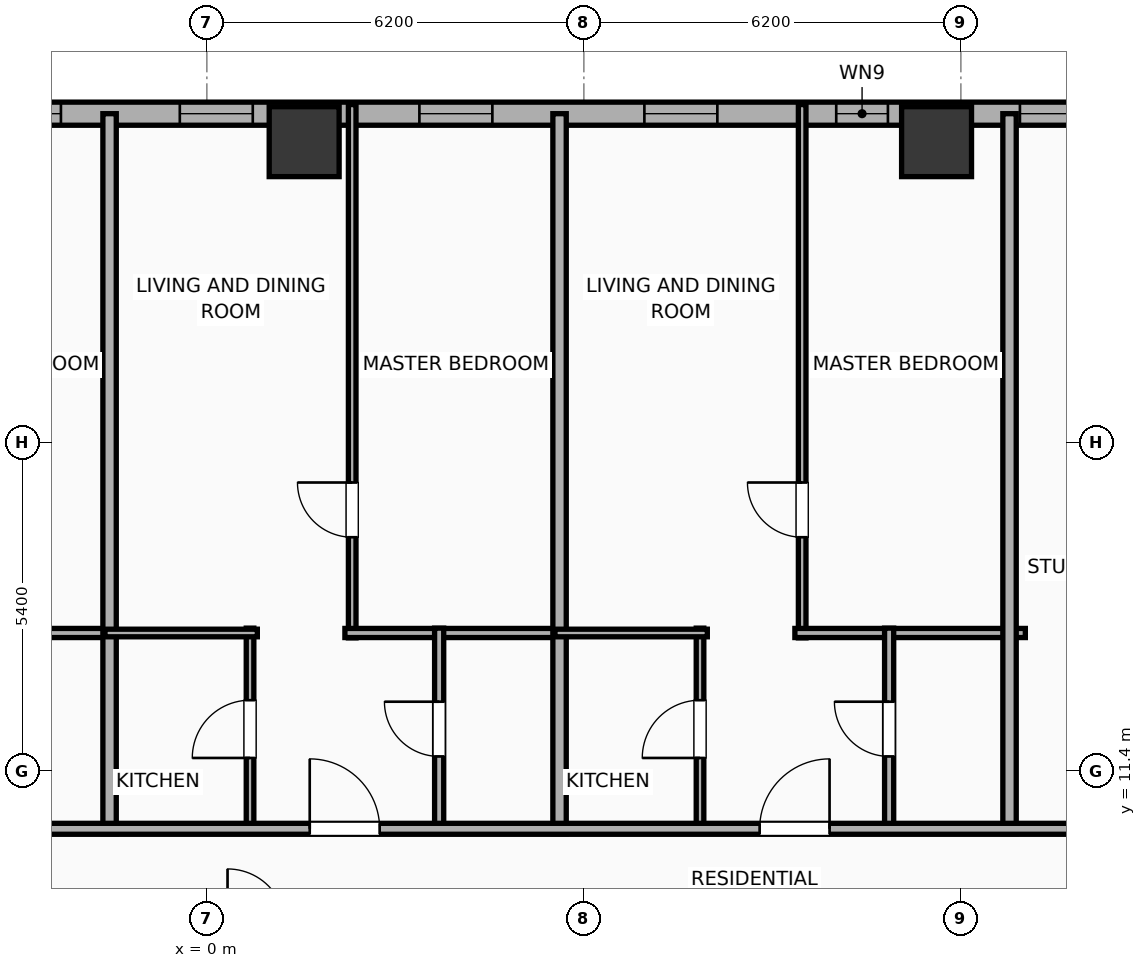
"""IFC4 building model, lengths in metres.
Left out: names, types, materials, properties, quantities, classifications, styles, units other than length and angle.
Written with IfcOpenShell. Run it as: python <this file> out.ifc"""

import sys

from ifc_helpers import new_model, si_unit, direction, frame, frame_2d, origin, origin_2d, place, context, subcontext, project, spatial, rectangle, hollow_rectangle, extrude, element, fill, save


model = new_model("IFC4")
c1 = context("Model", 3, precision=1e-05, world=origin(), true_north=direction((0.0, 1.0)))
c2 = subcontext(c1, "Body", "Model", "MODEL_VIEW")
j1 = project(units=[si_unit("LENGTHUNIT", "METRE"), si_unit("PLANEANGLEUNIT", "RADIAN")], contexts=[c1])
p1 = place(None, origin())
s1 = spatial("IfcSite", under=j1, at=p1, CompositionType="ELEMENT")
p2 = place(p1, origin())
s2 = spatial("IfcBuilding", under=s1, at=p2, CompositionType="ELEMENT")
p3 = place(p2, frame((0.0, 0.0, 57.2)))
s3 = spatial("IfcBuildingStorey", under=s2, at=p3, CompositionType="ELEMENT", Elevation=57.2)
for number, where, z_axis, x_axis in (
    (1, (12.0, 21.75, 0.0), (0.0, 0.0, 1.0), (1.0, 0.0, 0.0)),
    (2, (1.6, 21.75, 0.0), (0.0, 0.0, 1.0), (1.0, 0.0, 0.0)),
):
    element("IfcColumn", number, at=place(p3, frame(where, z_axis=z_axis, x_axis=x_axis)), inside=s3, PredefinedType="COLUMN", context=c2, shape_type="SweptSolid", body=[
        extrude(hollow_rectangle(XDim=1.15, YDim=1.15, WallThickness=0.04, at=origin_2d()), origin(), (0.0, 0.0, 1.0), 3.9),
    ])
p4 = place(p3, frame((-29.581, 22.21, 0.0), z_axis=(0.0, 0.0, 1.0), x_axis=(1.0, 0.0, 0.0)))
e3 = element("IfcWall", 3, at=p4, inside=s3, PredefinedType="ELEMENTEDWALL", context=c2, shape_type="SweptSolid", body=[
    extrude(rectangle(XDim=51.963, YDim=0.38, at=frame_2d((25.981, 0.0))), origin(), (0.0, 0.0, 1.0), 3.65),
])
p5 = place(p4, frame((6.61, 0.0, 0.75)))
e4 = element("IfcOpeningElement", 4, at=p5, cuts=e3, PredefinedType="OPENING", context=c2, shape_type="SweptSolid", body=[
    extrude(rectangle(XDim=2.4, YDim=2.1, at=frame_2d((1.2, 1.05))), frame((0.0, 0.2, 0.0), z_axis=(0.0, -1.0, 0.0), x_axis=(1.0, 0.0, 0.0)), (0.0, 0.0, 1.0), 0.4),
])
p6 = place(p4, frame((24.781, 0.0, 0.75)))
e5 = element("IfcOpeningElement", 5, at=p6, cuts=e3, PredefinedType="OPENING", context=c2, shape_type="SweptSolid", body=[
    extrude(rectangle(XDim=2.4, YDim=2.1, at=frame_2d((1.2, 1.05))), frame((0.0, 0.2, 0.0), z_axis=(0.0, -1.0, 0.0), x_axis=(1.0, 0.0, 0.0)), (0.0, 0.0, 1.0), 0.4),
])
p7 = place(p4, frame((42.952, 0.0, 0.75)))
e6 = element("IfcOpeningElement", 6, at=p7, cuts=e3, PredefinedType="OPENING", context=c2, shape_type="SweptSolid", body=[
    extrude(rectangle(XDim=2.4, YDim=2.1, at=frame_2d((1.2, 1.05))), frame((0.0, 0.2, 0.0), z_axis=(0.0, -1.0, 0.0), x_axis=(1.0, 0.0, 0.0)), (0.0, 0.0, 1.0), 0.4),
])
p8 = place(p4, frame((3.476, 0.0, 0.75)))
e7 = element("IfcOpeningElement", 7, at=p8, cuts=e3, PredefinedType="OPENING", context=c2, shape_type="SweptSolid", body=[
    extrude(rectangle(XDim=1.2, YDim=2.05, at=frame_2d((0.6, 1.025))), frame((0.0, 0.2, 0.0), z_axis=(0.0, -1.0, 0.0), x_axis=(1.0, 0.0, 0.0)), (0.0, 0.0, 1.0), 0.4),
])
p9 = place(p4, frame((11.236, 0.0, 0.75)))
e8 = element("IfcOpeningElement", 8, at=p9, cuts=e3, PredefinedType="OPENING", context=c2, shape_type="SweptSolid", body=[
    extrude(rectangle(XDim=1.2, YDim=2.05, at=frame_2d((0.6, 1.025))), frame((0.0, 0.2, 0.0), z_axis=(0.0, -1.0, 0.0), x_axis=(1.0, 0.0, 0.0)), (0.0, 0.0, 1.0), 0.4),
])
p10 = place(p4, frame((14.576, 0.0, 0.75)))
e9 = element("IfcOpeningElement", 9, at=p10, cuts=e3, PredefinedType="OPENING", context=c2, shape_type="SweptSolid", body=[
    extrude(rectangle(XDim=1.2, YDim=2.05, at=frame_2d((0.6, 1.025))), frame((0.0, 0.2, 0.0), z_axis=(0.0, -1.0, 0.0), x_axis=(1.0, 0.0, 0.0)), (0.0, 0.0, 1.0), 0.4),
])
p11 = place(p4, frame((18.276, 0.0, 0.75)))
e10 = element("IfcOpeningElement", 10, at=p11, cuts=e3, PredefinedType="OPENING", context=c2, shape_type="SweptSolid", body=[
    extrude(rectangle(XDim=1.2, YDim=2.05, at=frame_2d((0.6, 1.025))), frame((0.0, 0.2, 0.0), z_axis=(0.0, -1.0, 0.0), x_axis=(1.0, 0.0, 0.0)), (0.0, 0.0, 1.0), 0.4),
])
p12 = place(p4, frame((21.976, 0.0, 0.75)))
e11 = element("IfcOpeningElement", 11, at=p12, cuts=e3, PredefinedType="OPENING", context=c2, shape_type="SweptSolid", body=[
    extrude(rectangle(XDim=1.2, YDim=2.05, at=frame_2d((0.6, 1.025))), frame((0.0, 0.2, 0.0), z_axis=(0.0, -1.0, 0.0), x_axis=(1.0, 0.0, 0.0)), (0.0, 0.0, 1.0), 0.4),
])
p13 = place(p4, frame((29.136, 0.0, 0.75)))
e12 = element("IfcOpeningElement", 12, at=p13, cuts=e3, PredefinedType="OPENING", context=c2, shape_type="SweptSolid", body=[
    extrude(rectangle(XDim=1.2, YDim=2.05, at=frame_2d((0.6, 1.025))), frame((0.0, 0.2, 0.0), z_axis=(0.0, -1.0, 0.0), x_axis=(1.0, 0.0, 0.0)), (0.0, 0.0, 1.0), 0.4),
])
p14 = place(p4, frame((33.076, 0.0, 0.75)))
e13 = element("IfcOpeningElement", 13, at=p14, cuts=e3, PredefinedType="OPENING", context=c2, shape_type="SweptSolid", body=[
    extrude(rectangle(XDim=1.2, YDim=2.05, at=frame_2d((0.6, 1.025))), frame((0.0, 0.2, 0.0), z_axis=(0.0, -1.0, 0.0), x_axis=(1.0, 0.0, 0.0)), (0.0, 0.0, 1.0), 0.4),
])
p15 = place(p4, frame((36.776, 0.0, 0.75)))
e14 = element("IfcOpeningElement", 14, at=p15, cuts=e3, PredefinedType="OPENING", context=c2, shape_type="SweptSolid", body=[
    extrude(rectangle(XDim=1.2, YDim=2.05, at=frame_2d((0.6, 1.025))), frame((0.0, 0.2, 0.0), z_axis=(0.0, -1.0, 0.0), x_axis=(1.0, 0.0, 0.0)), (0.0, 0.0, 1.0), 0.4),
])
p16 = place(p4, frame((39.931, 0.0, 0.75)))
e15 = element("IfcOpeningElement", 15, at=p16, cuts=e3, PredefinedType="OPENING", context=c2, shape_type="SweptSolid", body=[
    extrude(rectangle(XDim=0.85, YDim=2.05, at=frame_2d((0.425, 1.025))), frame((0.0, 0.2, 0.0), z_axis=(0.0, -1.0, 0.0), x_axis=(1.0, 0.0, 0.0)), (0.0, 0.0, 1.0), 0.4),
])
p17 = place(p4, frame((47.469, 0.0, 0.75)))
e16 = element("IfcOpeningElement", 16, at=p17, cuts=e3, PredefinedType="OPENING", context=c2, shape_type="SweptSolid", body=[
    extrude(rectangle(XDim=1.2, YDim=2.05, at=frame_2d((0.6, 1.025))), frame((0.0, 0.2, 0.0), z_axis=(0.0, -1.0, 0.0), x_axis=(1.0, 0.0, 0.0)), (0.0, 0.0, 1.0), 0.4),
])
p18 = place(p4, frame((49.581, 0.0, 0.75)))
e17 = element("IfcOpeningElement", 17, at=p18, cuts=e3, PredefinedType="OPENING", context=c2, shape_type="SweptSolid", body=[
    extrude(rectangle(XDim=1.2, YDim=2.05, at=frame_2d((0.6, 1.025))), frame((0.0, 0.2, 0.0), z_axis=(0.0, -1.0, 0.0), x_axis=(1.0, 0.0, 0.0)), (0.0, 0.0, 1.0), 0.4),
])
p19 = place(p3, frame((-5.13, 13.67, 0.0), z_axis=(0.0, 0.0, 1.0), x_axis=(1.0, 0.0, 0.0)))
e18 = element("IfcWall", 18, at=p19, inside=s3, PredefinedType="PLUMBINGWALL", context=c2, shape_type="SweptSolid", body=[
    extrude(rectangle(XDim=3.605, YDim=0.15, at=frame_2d((1.802, 0.0))), origin(), (0.0, 0.0, 1.0), 3.65),
])
p20 = place(p3, frame((-1.6, 10.37, 0.0), z_axis=(0.0, 0.0, 1.0), x_axis=(0.0, 1.0, 0.0)))
e19 = element("IfcWall", 19, at=p20, inside=s3, PredefinedType="PARTITIONING", context=c2, shape_type="SweptSolid", body=[
    extrude(rectangle(XDim=11.84, YDim=0.22, at=frame_2d((5.92, 0.0))), origin(), (0.0, 0.0, 1.0), 3.65),
])
p21 = place(p3, frame((2.39, 13.59, 0.0), z_axis=(0.0, 0.0, 1.0), x_axis=(0.0, 1.0, 0.0)))
e20 = element("IfcWall", 20, at=p21, inside=s3, PredefinedType="PARTITIONING", context=c2, shape_type="SweptSolid", body=[
    extrude(rectangle(XDim=8.77, YDim=0.125, at=frame_2d((4.385, 0.0))), origin(), (0.0, 0.0, 1.0), 2.94),
])
p22 = place(p21, frame((1.655, 0.0, 0.0)))
e21 = element("IfcOpeningElement", 21, at=p22, cuts=e20, PredefinedType="OPENING", context=c2, shape_type="SweptSolid", body=[
    extrude(rectangle(XDim=0.9, YDim=2.05, at=frame_2d((0.45, 1.025))), frame((0.0, 0.073, 0.0), z_axis=(0.0, -1.0, 0.0), x_axis=(1.0, 0.0, 0.0)), (0.0, 0.0, 1.0), 0.145),
])
p23 = place(p3, frame((2.27, 13.67, 0.0), z_axis=(0.0, 0.0, 1.0), x_axis=(1.0, 0.0, 0.0)))
e22 = element("IfcWall", 22, at=p23, inside=s3, PredefinedType="PLUMBINGWALL", context=c2, shape_type="SweptSolid", body=[
    extrude(rectangle(XDim=3.605, YDim=0.15, at=frame_2d((1.802, 0.0))), origin(), (0.0, 0.0, 1.0), 3.65),
])
p24 = place(p3, frame((0.71, 10.43, 0.0), z_axis=(0.0, 0.0, 1.0), x_axis=(0.0, 1.0, 0.0)))
e23 = element("IfcWall", 23, at=p24, inside=s3, PredefinedType="PARTITIONING", context=c2, shape_type="SweptSolid", body=[
    extrude(rectangle(XDim=3.32, YDim=0.125, at=frame_2d((1.66, 0.0))), origin(), (0.0, 0.0, 1.0), 3.65),
])
p25 = place(p24, frame((1.185, 0.0, 0.0)))
e24 = element("IfcOpeningElement", 24, at=p25, cuts=e23, PredefinedType="OPENING", context=c2, shape_type="SweptSolid", body=[
    extrude(rectangle(XDim=0.95, YDim=2.05, at=frame_2d((0.475, 1.025))), frame((0.0, 0.073, 0.0), z_axis=(0.0, -1.0, 0.0), x_axis=(1.0, 0.0, 0.0)), (0.0, 0.0, 1.0), 0.145),
])
p26 = place(p3, frame((-1.675, 13.67, 0.0), z_axis=(0.0, 0.0, 1.0), x_axis=(1.0, 0.0, 0.0)))
e25 = element("IfcWall", 25, at=p26, inside=s3, PredefinedType="PARTITIONING", context=c2, shape_type="SweptSolid", body=[
    extrude(rectangle(XDim=2.505, YDim=0.125, at=frame_2d((1.252, 0.0))), origin(), (0.0, 0.0, 1.0), 3.65),
])
p27 = place(p3, frame((3.82, 10.43, 0.0), z_axis=(0.0, 0.0, 1.0), x_axis=(0.0, 1.0, 0.0)))
e26 = element("IfcWall", 26, at=p27, inside=s3, PredefinedType="PLUMBINGWALL", context=c2, shape_type="SweptSolid", body=[
    extrude(rectangle(XDim=3.32, YDim=0.15, at=frame_2d((1.66, 0.0))), origin(), (0.0, 0.0, 1.0), 2.94),
])
p28 = place(p27, frame((1.21, 0.0, 0.0)))
e27 = element("IfcOpeningElement", 27, at=p28, cuts=e26, PredefinedType="OPENING", context=c2, shape_type="SweptSolid", body=[
    extrude(rectangle(XDim=0.9, YDim=2.05, at=frame_2d((0.45, 1.025))), frame((0.0, 0.085, 0.0), z_axis=(0.0, -1.0, 0.0), x_axis=(1.0, 0.0, 0.0)), (0.0, 0.0, 1.0), 0.17),
])
p29 = place(p3, frame((5.8, 10.37, 0.0), z_axis=(0.0, 0.0, 1.0), x_axis=(0.0, 1.0, 0.0)))
e28 = element("IfcWall", 28, at=p29, inside=s3, PredefinedType="PARTITIONING", context=c2, shape_type="SweptSolid", body=[
    extrude(rectangle(XDim=11.84, YDim=0.22, at=frame_2d((5.92, 0.0))), origin(), (0.0, 0.0, 1.0), 3.65),
])
p30 = place(p3, frame((9.79, 13.59, 0.0), z_axis=(0.0, 0.0, 1.0), x_axis=(0.0, 1.0, 0.0)))
e29 = element("IfcWall", 29, at=p30, inside=s3, PredefinedType="PARTITIONING", context=c2, shape_type="SweptSolid", body=[
    extrude(rectangle(XDim=8.77, YDim=0.125, at=frame_2d((4.385, 0.0))), origin(), (0.0, 0.0, 1.0), 3.65),
])
p31 = place(p30, frame((1.655, 0.0, 0.0)))
e30 = element("IfcOpeningElement", 30, at=p31, cuts=e29, PredefinedType="OPENING", context=c2, shape_type="SweptSolid", body=[
    extrude(rectangle(XDim=0.9, YDim=2.05, at=frame_2d((0.45, 1.025))), frame((0.0, 0.073, 0.0), z_axis=(0.0, -1.0, 0.0), x_axis=(1.0, 0.0, 0.0)), (0.0, 0.0, 1.0), 0.145),
])
p32 = place(p3, frame((9.67, 13.67, 0.0), z_axis=(0.0, 0.0, 1.0), x_axis=(1.0, 0.0, 0.0)))
e31 = element("IfcWall", 31, at=p32, inside=s3, PredefinedType="PLUMBINGWALL", context=c2, shape_type="SweptSolid", body=[
    extrude(rectangle(XDim=3.79, YDim=0.15, at=frame_2d((1.895, 0.0))), origin(), (0.0, 0.0, 1.0), 3.65),
])
p33 = place(p3, frame((8.11, 10.43, 0.0), z_axis=(0.0, 0.0, 1.0), x_axis=(0.0, 1.0, 0.0)))
e32 = element("IfcWall", 32, at=p33, inside=s3, PredefinedType="PARTITIONING", context=c2, shape_type="SweptSolid", body=[
    extrude(rectangle(XDim=3.32, YDim=0.125, at=frame_2d((1.66, 0.0))), origin(), (0.0, 0.0, 1.0), 3.65),
])
p34 = place(p33, frame((1.185, 0.0, 0.0)))
e33 = element("IfcOpeningElement", 33, at=p34, cuts=e32, PredefinedType="OPENING", context=c2, shape_type="SweptSolid", body=[
    extrude(rectangle(XDim=0.95, YDim=2.05, at=frame_2d((0.475, 1.025))), frame((0.0, 0.073, 0.0), z_axis=(0.0, -1.0, 0.0), x_axis=(1.0, 0.0, 0.0)), (0.0, 0.0, 1.0), 0.145),
])
p35 = place(p3, frame((5.725, 13.67, 0.0), z_axis=(0.0, 0.0, 1.0), x_axis=(1.0, 0.0, 0.0)))
e34 = element("IfcWall", 34, at=p35, inside=s3, PredefinedType="PARTITIONING", context=c2, shape_type="SweptSolid", body=[
    extrude(rectangle(XDim=2.505, YDim=0.125, at=frame_2d((1.252, 0.0))), origin(), (0.0, 0.0, 1.0), 3.65),
])
p36 = place(p3, frame((11.22, 10.43, 0.0), z_axis=(0.0, 0.0, 1.0), x_axis=(0.0, 1.0, 0.0)))
e35 = element("IfcWall", 35, at=p36, inside=s3, PredefinedType="PLUMBINGWALL", context=c2, shape_type="SweptSolid", body=[
    extrude(rectangle(XDim=3.32, YDim=0.15, at=frame_2d((1.66, 0.0))), origin(), (0.0, 0.0, 1.0), 3.65),
])
p37 = place(p36, frame((1.21, 0.0, 0.0)))
e36 = element("IfcOpeningElement", 36, at=p37, cuts=e35, PredefinedType="OPENING", context=c2, shape_type="SweptSolid", body=[
    extrude(rectangle(XDim=0.9, YDim=2.05, at=frame_2d((0.45, 1.025))), frame((0.0, 0.085, 0.0), z_axis=(0.0, -1.0, 0.0), x_axis=(1.0, 0.0, 0.0)), (0.0, 0.0, 1.0), 0.17),
])
p38 = place(p3, frame((13.2, 10.37, 0.0), z_axis=(0.0, 0.0, 1.0), x_axis=(0.0, 1.0, 0.0)))
e37 = element("IfcWall", 37, at=p38, inside=s3, PredefinedType="PARTITIONING", context=c2, shape_type="SweptSolid", body=[
    extrude(rectangle(XDim=11.84, YDim=0.22, at=frame_2d((5.92, 0.0))), origin(), (0.0, 0.0, 1.0), 3.65),
])
p39 = place(p3, frame((-33.41, 10.45, 0.0), z_axis=(0.0, 0.0, 1.0), x_axis=(1.0, 0.0, 0.0)))
e38 = element("IfcWall", 38, at=p39, inside=s3, PredefinedType="PARTITIONING", context=c2, shape_type="SweptSolid", body=[
    extrude(rectangle(XDim=59.62, YDim=0.18, at=frame_2d((29.81, 0.0))), origin(), (0.0, 0.0, 1.0), 3.65),
])
p40 = place(p39, frame((4.529, 0.0, 0.0)))
e39 = element("IfcOpeningElement", 39, at=p40, cuts=e38, PredefinedType="OPENING", context=c2, shape_type="SweptSolid", body=[
    extrude(rectangle(XDim=1.15, YDim=2.05, at=frame_2d((0.575, 1.025))), frame((0.0, 0.1, 0.0), z_axis=(0.0, -1.0, 0.0), x_axis=(1.0, 0.0, 0.0)), (0.0, 0.0, 1.0), 0.2),
])
p41 = place(p39, frame((12.899, 0.0, 0.0)))
e40 = element("IfcOpeningElement", 40, at=p41, cuts=e38, PredefinedType="OPENING", context=c2, shape_type="SweptSolid", body=[
    extrude(rectangle(XDim=1.15, YDim=2.05, at=frame_2d((0.575, 1.025))), frame((0.0, 0.1, 0.0), z_axis=(0.0, -1.0, 0.0), x_axis=(1.0, 0.0, 0.0)), (0.0, 0.0, 1.0), 0.2),
])
p42 = place(p39, frame((20.298, 0.0, 0.0)))
e41 = element("IfcOpeningElement", 41, at=p42, cuts=e38, PredefinedType="OPENING", context=c2, shape_type="SweptSolid", body=[
    extrude(rectangle(XDim=1.15, YDim=2.05, at=frame_2d((0.575, 1.025))), frame((0.0, 0.1, 0.0), z_axis=(0.0, -1.0, 0.0), x_axis=(1.0, 0.0, 0.0)), (0.0, 0.0, 1.0), 0.2),
])
p43 = place(p39, frame((27.703, 0.0, 0.0)))
e42 = element("IfcOpeningElement", 42, at=p43, cuts=e38, PredefinedType="OPENING", context=c2, shape_type="SweptSolid", body=[
    extrude(rectangle(XDim=1.15, YDim=2.05, at=frame_2d((0.575, 1.025))), frame((0.0, 0.1, 0.0), z_axis=(0.0, -1.0, 0.0), x_axis=(1.0, 0.0, 0.0)), (0.0, 0.0, 1.0), 0.2),
])
p44 = place(p39, frame((35.102, 0.0, 0.0)))
e43 = element("IfcOpeningElement", 43, at=p44, cuts=e38, PredefinedType="OPENING", context=c2, shape_type="SweptSolid", body=[
    extrude(rectangle(XDim=1.15, YDim=2.05, at=frame_2d((0.575, 1.025))), frame((0.0, 0.1, 0.0), z_axis=(0.0, -1.0, 0.0), x_axis=(1.0, 0.0, 0.0)), (0.0, 0.0, 1.0), 0.2),
])
p45 = place(p39, frame((42.5, 0.0, 0.0)))
e44 = element("IfcOpeningElement", 44, at=p45, cuts=e38, PredefinedType="OPENING", context=c2, shape_type="SweptSolid", body=[
    extrude(rectangle(XDim=1.15, YDim=2.05, at=frame_2d((0.575, 1.025))), frame((0.0, 0.1, 0.0), z_axis=(0.0, -1.0, 0.0), x_axis=(1.0, 0.0, 0.0)), (0.0, 0.0, 1.0), 0.2),
])
p46 = place(p39, frame((48.099, 0.0, 0.0)))
e45 = element("IfcOpeningElement", 45, at=p46, cuts=e38, PredefinedType="OPENING", context=c2, shape_type="SweptSolid", body=[
    extrude(rectangle(XDim=1.15, YDim=2.05, at=frame_2d((0.575, 1.025))), frame((0.0, 0.1, 0.0), z_axis=(0.0, -1.0, 0.0), x_axis=(1.0, 0.0, 0.0)), (0.0, 0.0, 1.0), 0.2),
])
p47 = place(p39, frame((56.117, 0.0, 0.0)))
e46 = element("IfcOpeningElement", 46, at=p47, cuts=e38, PredefinedType="OPENING", context=c2, shape_type="SweptSolid", body=[
    extrude(rectangle(XDim=0.9, YDim=2.05, at=frame_2d((0.45, 1.025))), frame((0.0, 0.1, 0.0), z_axis=(0.0, -1.0, 0.0), x_axis=(1.0, 0.0, 0.0)), (0.0, 0.0, 1.0), 0.2),
])
p48 = place(p6, origin())
e47 = element("IfcWindow", 47, at=p48, inside=s3, PartitioningType="SINGLE_PANEL", PredefinedType="WINDOW", context=c2, shape_type="SweptSolid", body=[
    extrude(rectangle(XDim=2.4, YDim=2.1, at=frame_2d((1.2, 1.05))), frame((0.0, 0.03, 0.0), z_axis=(0.0, -1.0, 0.0), x_axis=(1.0, 0.0, 0.0)), (0.0, 0.0, 1.0), 0.06),
])
fill(e5, e47)
p49 = place(p7, origin())
e48 = element("IfcWindow", 48, at=p49, inside=s3, PartitioningType="SINGLE_PANEL", PredefinedType="WINDOW", context=c2, shape_type="SweptSolid", body=[
    extrude(rectangle(XDim=2.4, YDim=2.1, at=frame_2d((1.2, 1.05))), frame((0.0, 0.03, 0.0), z_axis=(0.0, -1.0, 0.0), x_axis=(1.0, 0.0, 0.0)), (0.0, 0.0, 1.0), 0.06),
])
fill(e6, e48)
p50 = place(p13, origin())
e49 = element("IfcWindow", 49, at=p50, inside=s3, PartitioningType="SINGLE_PANEL", PredefinedType="WINDOW", context=c2, shape_type="SweptSolid", body=[
    extrude(rectangle(XDim=1.2, YDim=2.05, at=frame_2d((0.6, 1.025))), frame((0.0, 0.03, 0.0), z_axis=(0.0, -1.0, 0.0), x_axis=(1.0, 0.0, 0.0)), (0.0, 0.0, 1.0), 0.06),
])
fill(e12, e49)
p51 = place(p14, origin())
e50 = element("IfcWindow", 50, at=p51, inside=s3, PartitioningType="SINGLE_PANEL", PredefinedType="WINDOW", context=c2, shape_type="SweptSolid", body=[
    extrude(rectangle(XDim=1.2, YDim=2.05, at=frame_2d((0.6, 1.025))), frame((0.0, 0.03, 0.0), z_axis=(0.0, -1.0, 0.0), x_axis=(1.0, 0.0, 0.0)), (0.0, 0.0, 1.0), 0.06),
])
fill(e13, e50)
p52 = place(p15, origin())
e51 = element("IfcWindow", 51, at=p52, inside=s3, PartitioningType="SINGLE_PANEL", PredefinedType="WINDOW", context=c2, shape_type="SweptSolid", body=[
    extrude(rectangle(XDim=1.2, YDim=2.05, at=frame_2d((0.6, 1.025))), frame((0.0, 0.03, 0.0), z_axis=(0.0, -1.0, 0.0), x_axis=(1.0, 0.0, 0.0)), (0.0, 0.0, 1.0), 0.06),
])
fill(e14, e51)
p53 = place(p16, origin())
e52 = element("IfcWindow", 52, at=p53, inside=s3, PartitioningType="SINGLE_PANEL", PredefinedType="WINDOW", context=c2, shape_type="SweptSolid", body=[
    extrude(rectangle(XDim=0.85, YDim=2.05, at=frame_2d((0.425, 1.025))), frame((0.0, 0.03, 0.0), z_axis=(0.0, -1.0, 0.0), x_axis=(1.0, 0.0, 0.0)), (0.0, 0.0, 1.0), 0.06),
])
fill(e15, e52)
p54 = place(p22, origin())
e53 = element("IfcDoor", 53, at=p54, inside=s3, OperationType="SINGLE_SWING_RIGHT", PredefinedType="DOOR", context=c2, shape_type="SweptSolid", body=[
    extrude(rectangle(XDim=0.9, YDim=2.05, at=frame_2d((0.45, 1.025))), frame((0.0, 0.025, 0.0), z_axis=(0.0, -1.0, 0.0), x_axis=(1.0, 0.0, 0.0)), (0.0, 0.0, 1.0), 0.05),
])
fill(e21, e53)
p55 = place(p25, origin())
e54 = element("IfcDoor", 54, at=p55, inside=s3, OperationType="SINGLE_SWING_LEFT", PredefinedType="DOOR", context=c2, shape_type="SweptSolid", body=[
    extrude(rectangle(XDim=0.95, YDim=2.05, at=frame_2d((0.475, 1.025))), frame((0.0, 0.025, 0.0), z_axis=(0.0, -1.0, 0.0), x_axis=(1.0, 0.0, 0.0)), (0.0, 0.0, 1.0), 0.05),
])
fill(e24, e54)
p56 = place(p28, origin())
e55 = element("IfcDoor", 55, at=p56, inside=s3, OperationType="SINGLE_SWING_RIGHT", PredefinedType="DOOR", context=c2, shape_type="SweptSolid", body=[
    extrude(rectangle(XDim=0.9, YDim=2.05, at=frame_2d((0.45, 1.025))), frame((0.0, 0.025, 0.0), z_axis=(0.0, -1.0, 0.0), x_axis=(1.0, 0.0, 0.0)), (0.0, 0.0, 1.0), 0.05),
])
fill(e27, e55)
p57 = place(p31, origin())
e56 = element("IfcDoor", 56, at=p57, inside=s3, OperationType="SINGLE_SWING_RIGHT", PredefinedType="DOOR", context=c2, shape_type="SweptSolid", body=[
    extrude(rectangle(XDim=0.9, YDim=2.05, at=frame_2d((0.45, 1.025))), frame((0.0, 0.025, 0.0), z_axis=(0.0, -1.0, 0.0), x_axis=(1.0, 0.0, 0.0)), (0.0, 0.0, 1.0), 0.05),
])
fill(e30, e56)
p58 = place(p34, origin())
e57 = element("IfcDoor", 57, at=p58, inside=s3, OperationType="SINGLE_SWING_LEFT", PredefinedType="DOOR", context=c2, shape_type="SweptSolid", body=[
    extrude(rectangle(XDim=0.95, YDim=2.05, at=frame_2d((0.475, 1.025))), frame((0.0, 0.025, 0.0), z_axis=(0.0, -1.0, 0.0), x_axis=(1.0, 0.0, 0.0)), (0.0, 0.0, 1.0), 0.05),
])
fill(e33, e57)
p59 = place(p37, origin())
e58 = element("IfcDoor", 58, at=p59, inside=s3, OperationType="SINGLE_SWING_RIGHT", PredefinedType="DOOR", context=c2, shape_type="SweptSolid", body=[
    extrude(rectangle(XDim=0.9, YDim=2.05, at=frame_2d((0.45, 1.025))), frame((0.0, 0.025, 0.0), z_axis=(0.0, -1.0, 0.0), x_axis=(1.0, 0.0, 0.0)), (0.0, 0.0, 1.0), 0.05),
])
fill(e36, e58)
p60 = place(p44, origin())
e59 = element("IfcDoor", 59, at=p60, inside=s3, OperationType="SINGLE_SWING_LEFT", PredefinedType="DOOR", context=c2, shape_type="SweptSolid", body=[
    extrude(rectangle(XDim=1.15, YDim=2.05, at=frame_2d((0.575, 1.025))), frame((0.0, 0.025, 0.0), z_axis=(0.0, -1.0, 0.0), x_axis=(1.0, 0.0, 0.0)), (0.0, 0.0, 1.0), 0.05),
])
fill(e43, e59)
p61 = place(p45, origin())
e60 = element("IfcDoor", 60, at=p61, inside=s3, OperationType="SINGLE_SWING_RIGHT", PredefinedType="DOOR", context=c2, shape_type="SweptSolid", body=[
    extrude(rectangle(XDim=1.15, YDim=2.05, at=frame_2d((0.575, 1.025))), frame((0.0, 0.025, 0.0), z_axis=(0.0, -1.0, 0.0), x_axis=(1.0, 0.0, 0.0)), (0.0, 0.0, 1.0), 0.05),
])
fill(e44, e60)
save(model, sys.argv[1])
